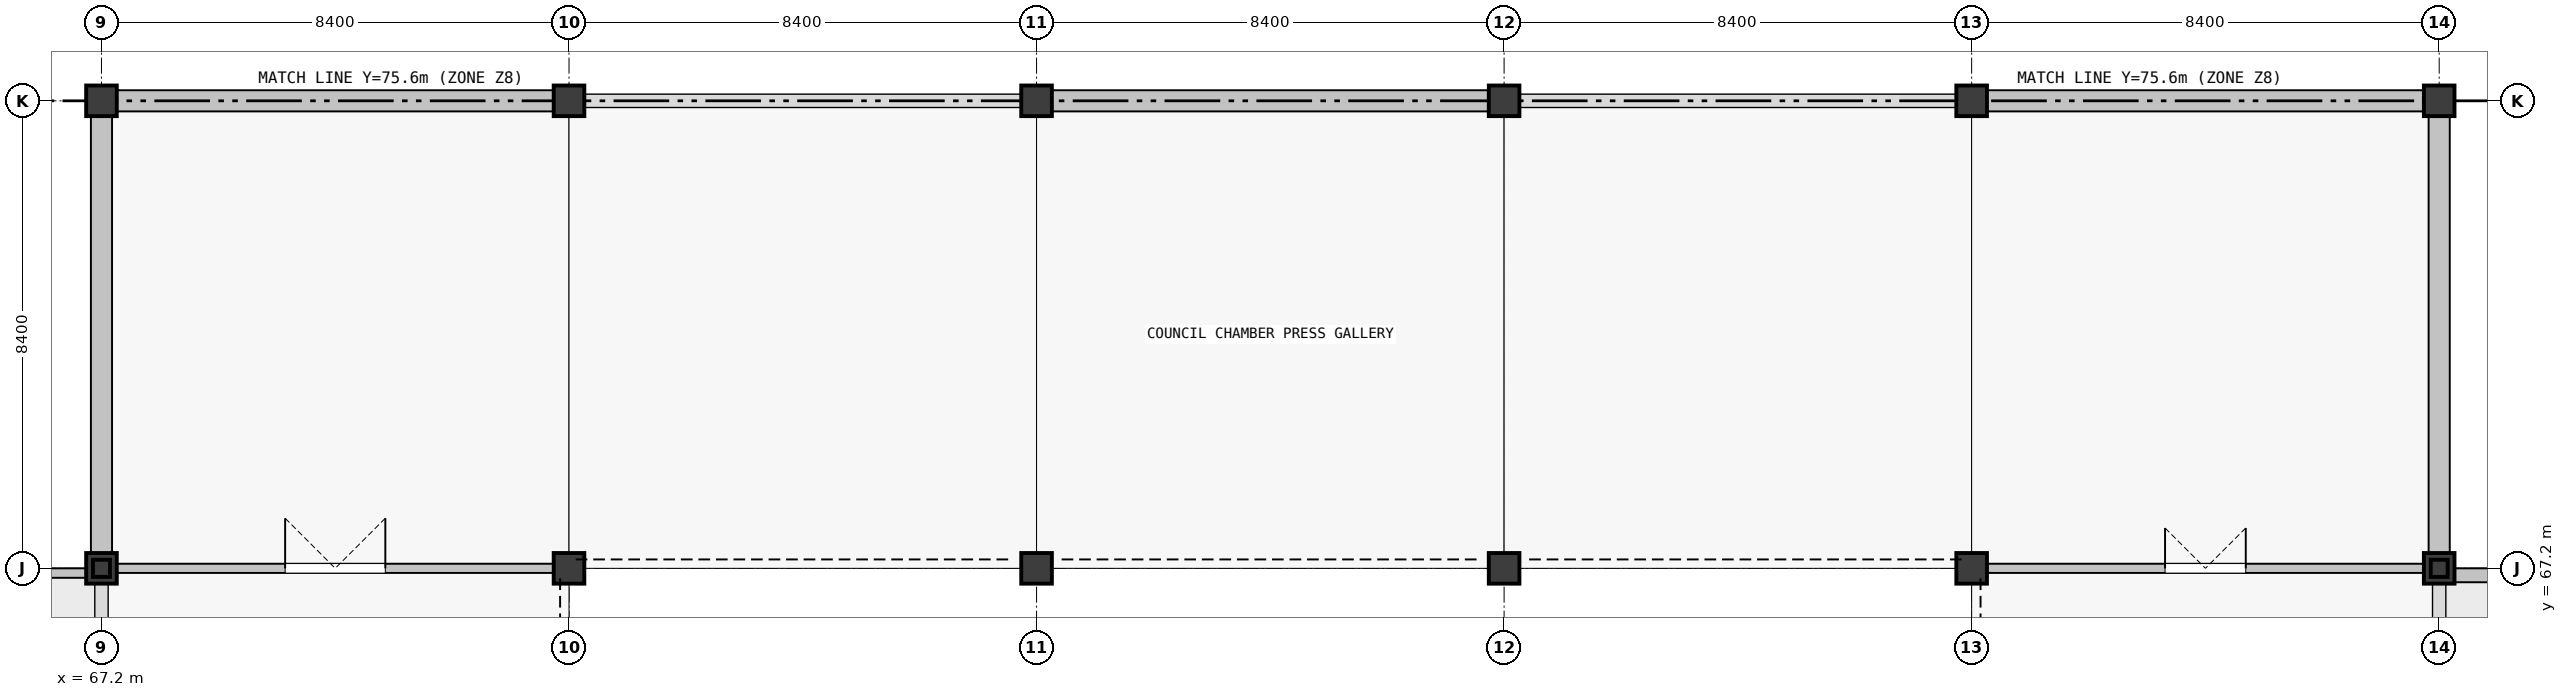
"""IFC4 building model, lengths in metres.
Left out: names, types, materials, properties, quantities, classifications, styles, units other than length and angle.
Written with IfcOpenShell. Run it as: python <this file> out.ifc"""

import sys

from ifc_helpers import new_model, si_unit, direction, frame, frame_2d, origin, origin_2d, place, context, subcontext, project, spatial, rectangle, i_section, extrude, element, fill, save


model = new_model("IFC4")
c1 = context("Model", 3, precision=1e-05, world=origin(), true_north=direction((0.0, 1.0)))
c2 = subcontext(c1, "Body", "Model", "MODEL_VIEW")
j1 = project(units=[si_unit("LENGTHUNIT", "METRE"), si_unit("PLANEANGLEUNIT", "RADIAN")], contexts=[c1])
p1 = place(None, origin())
s1 = spatial("IfcSite", under=j1, at=p1, CompositionType="ELEMENT")
p2 = place(p1, origin())
s2 = spatial("IfcBuilding", under=s1, at=p2, CompositionType="ELEMENT")
p3 = place(p2, frame((0.0, 0.0, 14.76)))
s3 = spatial("IfcBuildingStorey", under=s2, at=p3, CompositionType="ELEMENT", Elevation=14.76)
for number, where, z_axis, x_axis in (
    (1, (67.2, 67.2, 0.0), (0.0, 0.0, 1.0), (1.0, 0.0, 0.0)),
    (2, (67.2, 75.6, 0.0), (0.0, 0.0, 1.0), (1.0, 0.0, 0.0)),
    (3, (75.6, 67.2, 0.0), (0.0, 0.0, 1.0), (1.0, 0.0, 0.0)),
    (4, (75.6, 75.6, 0.0), (0.0, 0.0, 1.0), (1.0, 0.0, 0.0)),
    (5, (84.0, 67.2, 0.0), (0.0, 0.0, 1.0), (1.0, 0.0, 0.0)),
    (6, (84.0, 75.6, 0.0), (0.0, 0.0, 1.0), (1.0, 0.0, 0.0)),
    (7, (92.4, 67.2, 0.0), (0.0, 0.0, 1.0), (1.0, 0.0, 0.0)),
    (8, (92.4, 75.6, 0.0), (0.0, 0.0, 1.0), (1.0, 0.0, 0.0)),
    (9, (100.8, 67.2, 0.0), (0.0, 0.0, 1.0), (1.0, 0.0, 0.0)),
    (10, (100.8, 75.6, 0.0), (0.0, 0.0, 1.0), (1.0, 0.0, 0.0)),
    (11, (109.2, 67.2, 0.0), (0.0, 0.0, 1.0), (1.0, 0.0, 0.0)),
    (12, (109.2, 75.6, 0.0), (0.0, 0.0, 1.0), (1.0, 0.0, 0.0)),
):
    element("IfcColumn", number, at=place(p3, frame(where, z_axis=z_axis, x_axis=x_axis)), inside=s3, PredefinedType="COLUMN", context=c2, shape_type="SweptSolid", body=[
        extrude(rectangle(XDim=0.55, YDim=0.55, at=origin_2d()), origin(), (0.0, 0.0, 1.0), 4.14),
    ])
for number, where, z_axis, x_axis in (
    (13, (67.2, 67.2, 4.14), (0.0, 0.0, 1.0), (1.0, 0.0, 0.0)),
    (14, (109.2, 67.2, 4.14), (0.0, 0.0, 1.0), (1.0, 0.0, 0.0)),
):
    element("IfcColumn", number, at=place(p3, frame(where, z_axis=z_axis, x_axis=x_axis)), inside=s3, PredefinedType="COLUMN", context=c2, shape_type="SweptSolid", body=[
        extrude(i_section(OverallWidth=0.305, OverallDepth=0.308, WebThickness=0.01, FlangeThickness=0.015, FilletRadius=0.017, at=origin_2d()), origin(), (0.0, 0.0, 1.0), 1.709),
    ])
for number, where, z_axis, x_axis in (
    (15, (67.2, 67.476, 0.0), (0.0, 0.0, 1.0), (0.0, 1.0, 0.0)),
    (16, (67.476, 75.6, 0.0), (0.0, 0.0, 1.0), (1.0, 0.0, 0.0)),
):
    element("IfcWall", number, at=place(p3, frame(where, z_axis=z_axis, x_axis=x_axis)), inside=s3, PredefinedType="SOLIDWALL", context=c2, shape_type="SweptSolid", body=[
        extrude(rectangle(XDim=7.848, YDim=0.38, at=frame_2d((3.924, 0.0))), origin(), (0.0, 0.0, 1.0), 2.52),
    ])
for number, where, z_axis, x_axis in (
    (17, (84.276, 75.6, 0.0), (0.0, 0.0, 1.0), (1.0, 0.0, 0.0)),
    (18, (101.076, 75.6, 0.0), (0.0, 0.0, 1.0), (1.0, 0.0, 0.0)),
):
    element("IfcWall", number, at=place(p3, frame(where, z_axis=z_axis, x_axis=x_axis)), inside=s3, PredefinedType="SOLIDWALL", context=c2, shape_type="SweptSolid", body=[
        extrude(rectangle(XDim=7.848, YDim=0.38, at=frame_2d((3.924, 0.0))), origin(), (0.0, 0.0, 1.0), 2.52),
    ])
p4 = place(p3, frame((109.2, 75.324, 0.0), z_axis=(0.0, 0.0, 1.0), x_axis=(0.0, -1.0, 0.0)))
e19 = element("IfcWall", 19, at=p4, inside=s3, PredefinedType="SOLIDWALL", context=c2, shape_type="SweptSolid", body=[
    extrude(rectangle(XDim=7.848, YDim=0.38, at=frame_2d((3.924, 0.0))), origin(), (0.0, 0.0, 1.0), 2.52),
])
p5 = place(p3, frame((59.06, 67.115, 0.0), z_axis=(0.0, 0.0, 1.0), x_axis=(1.0, 0.0, 0.0)))
e20 = element("IfcWall", 20, at=p5, inside=s3, PredefinedType="PARAPET", context=c2, shape_type="SweptSolid", body=[
    extrude(rectangle(XDim=7.88, YDim=0.17, at=frame_2d((3.94, 0.0))), origin(), (0.0, 0.0, 1.0), 0.95),
])
p6 = place(p3, frame((109.46, 67.075, 0.0), z_axis=(0.0, 0.0, 1.0), x_axis=(1.0, 0.0, 0.0)))
e21 = element("IfcWall", 21, at=p6, inside=s3, PredefinedType="PARAPET", context=c2, shape_type="SweptSolid", body=[
    extrude(rectangle(XDim=7.88, YDim=0.25, at=frame_2d((3.94, 0.0))), origin(), (0.0, 0.0, 1.0), 0.95),
])
p7 = place(p3, frame((67.477, 67.2, 0.0), z_axis=(0.0, 0.0, 1.0), x_axis=(1.0, 0.0, 0.0)))
e22 = element("IfcWall", 22, at=p7, inside=s3, PredefinedType="PARTITIONING", context=c2, shape_type="SweptSolid", body=[
    extrude(rectangle(XDim=7.846, YDim=0.165, at=frame_2d((3.923, 0.0))), origin(), (0.0, 0.0, 1.0), 3.19),
])
p8 = place(p7, frame((3.023, 0.0, 0.0)))
e23 = element("IfcOpeningElement", 23, at=p8, cuts=e22, PredefinedType="OPENING", context=c2, shape_type="SweptSolid", body=[
    extrude(rectangle(XDim=1.8, YDim=2.4, at=frame_2d((0.9, 1.2))), frame((0.0, 0.083, 0.0), z_axis=(0.0, -1.0, 0.0), x_axis=(1.0, 0.0, 0.0)), (0.0, 0.0, 1.0), 0.165),
])
p9 = place(p3, frame((101.077, 67.2, 0.0), z_axis=(0.0, 0.0, 1.0), x_axis=(1.0, 0.0, 0.0)))
e24 = element("IfcWall", 24, at=p9, inside=s3, PredefinedType="PARTITIONING", context=c2, shape_type="SweptSolid", body=[
    extrude(rectangle(XDim=7.846, YDim=0.165, at=frame_2d((3.923, 0.0))), origin(), (0.0, 0.0, 1.0), 3.19),
])
p10 = place(p9, frame((3.198, 0.0, 0.0)))
e25 = element("IfcOpeningElement", 25, at=p10, cuts=e24, PredefinedType="OPENING", context=c2, shape_type="SweptSolid", body=[
    extrude(rectangle(XDim=1.45, YDim=2.2, at=frame_2d((0.725, 1.1))), frame((0.0, 0.083, 0.0), z_axis=(0.0, -1.0, 0.0), x_axis=(1.0, 0.0, 0.0)), (0.0, 0.0, 1.0), 0.165),
])
p11 = place(p8, origin())
e26 = element("IfcDoor", 26, at=p11, inside=s3, OperationType="DOUBLE_DOOR_SINGLE_SWING", PredefinedType="DOOR", context=c2, shape_type="SweptSolid", body=[
    extrude(rectangle(XDim=1.8, YDim=2.4, at=frame_2d((0.9, 1.2))), frame((0.0, 0.025, 0.0), z_axis=(0.0, -1.0, 0.0), x_axis=(1.0, 0.0, 0.0)), (0.0, 0.0, 1.0), 0.05),
])
fill(e23, e26)
p12 = place(p10, origin())
e27 = element("IfcDoor", 27, at=p12, inside=s3, OperationType="DOUBLE_DOOR_SINGLE_SWING", PredefinedType="DOOR", context=c2, shape_type="SweptSolid", body=[
    extrude(rectangle(XDim=1.45, YDim=2.2, at=frame_2d((0.725, 1.1))), frame((0.0, 0.025, 0.0), z_axis=(0.0, -1.0, 0.0), x_axis=(1.0, 0.0, 0.0)), (0.0, 0.0, 1.0), 0.05),
])
fill(e25, e27)
save(model, sys.argv[1])
